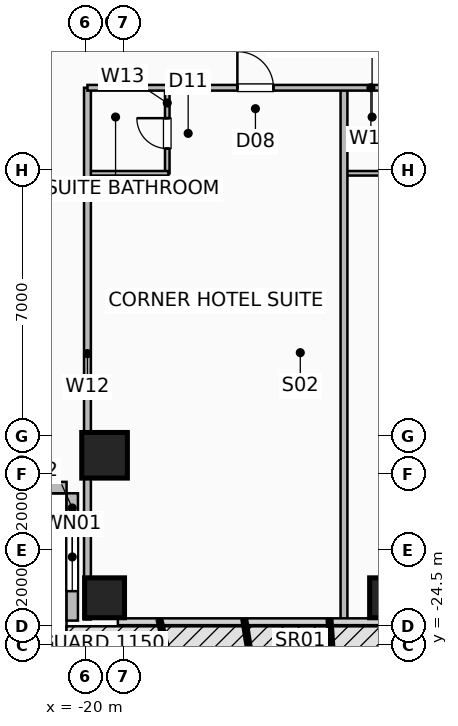
"""IFC4 building model, lengths in metres.
Left out: names, types, materials, properties, quantities, classifications, styles, units other than length and angle.
Written with IfcOpenShell. Run it as: python <this file> out.ifc"""

import sys

from ifc_helpers import new_model, si_unit, direction, frame, frame_2d, origin, origin_2d, place, context, subcontext, project, spatial, rectangle, hollow_rectangle, extrude, element, fill, save


model = new_model("IFC4")
c1 = context("Model", 3, precision=1e-05, world=origin(), true_north=direction((0.0, 1.0)))
c2 = subcontext(c1, "Body", "Model", "MODEL_VIEW")
j1 = project(units=[si_unit("LENGTHUNIT", "METRE"), si_unit("PLANEANGLEUNIT", "RADIAN")], contexts=[c1])
p1 = place(None, origin())
s1 = spatial("IfcSite", under=j1, at=p1, CompositionType="ELEMENT")
p2 = place(p1, origin())
s2 = spatial("IfcBuilding", under=s1, at=p2, CompositionType="ELEMENT")
p3 = place(p2, frame((0.0, 0.0, 27.0)))
s3 = spatial("IfcBuildingStorey", under=s2, at=p3, CompositionType="ELEMENT", Elevation=27.0)
p4 = place(p3, frame((-19.5, -23.25, 0.0), z_axis=(0.0, 0.0, 1.0), x_axis=(1.0, 0.0, 0.0)))
e1 = element("IfcColumn", 1, at=p4, inside=s3, PredefinedType="COLUMN", context=c2, shape_type="SweptSolid", body=[
    extrude(hollow_rectangle(XDim=1.05, YDim=1.05, WallThickness=0.05, at=origin_2d()), origin(), (0.0, 0.0, 1.0), 3.5),
])
p5 = place(p3, frame((-12.0, -23.25, -0.4), z_axis=(0.0, 0.0, 1.0), x_axis=(1.0, 0.0, 0.0)))
e2 = element("IfcColumn", 2, at=p5, inside=s3, PredefinedType="COLUMN", context=c2, shape_type="SweptSolid", body=[
    extrude(hollow_rectangle(XDim=1.05, YDim=1.05, WallThickness=0.05, at=origin_2d()), origin(), (0.0, 0.0, 1.0), 3.9),
])
p6 = place(p3, frame((-19.5, -19.5, 0.0), z_axis=(0.0, 0.0, 1.0), x_axis=(1.0, 0.0, 0.0)))
e3 = element("IfcColumn", 3, at=p6, inside=s3, PredefinedType="COLUMN", context=c2, shape_type="SweptSolid", body=[
    extrude(hollow_rectangle(XDim=1.2, YDim=1.2, WallThickness=0.055, at=origin_2d()), origin(), (0.0, 0.0, 1.0), 3.5),
])
p7 = place(p3, frame((-20.35, -23.85, 0.0), z_axis=(0.0, 0.0, 1.0), x_axis=(0.0, 1.0, 0.0)))
e4 = element("IfcWall", 4, at=p7, inside=s3, PredefinedType="SOLIDWALL", context=c2, shape_type="SweptSolid", body=[
    extrude(rectangle(XDim=3.35, YDim=0.3, at=frame_2d((1.675, 0.0))), origin(), (0.0, 0.0, 1.0), 3.25),
])
p8 = place(p7, frame((0.775, 0.0, 0.9)))
e5 = element("IfcOpeningElement", 5, at=p8, cuts=e4, PredefinedType="OPENING", context=c2, shape_type="SweptSolid", body=[
    extrude(rectangle(XDim=1.8, YDim=1.8, at=frame_2d((0.9, 0.9))), frame((0.0, 0.16, 0.0), z_axis=(0.0, -1.0, 0.0), x_axis=(1.0, 0.0, 0.0)), (0.0, 0.0, 1.0), 0.32),
])
p9 = place(p3, frame((-23.85, -20.35, 0.0), z_axis=(0.0, 0.0, 1.0), x_axis=(1.0, 0.0, 0.0)))
e6 = element("IfcWall", 6, at=p9, inside=s3, PredefinedType="SOLIDWALL", context=c2, shape_type="SweptSolid", body=[
    extrude(rectangle(XDim=3.35, YDim=0.3, at=frame_2d((1.675, 0.0))), origin(), (0.0, 0.0, 1.0), 3.25),
])
p10 = place(p3, frame((-17.85, -12.08, 0.0), z_axis=(0.0, 0.0, 1.0), x_axis=(0.0, 1.0, 0.0)))
e7 = element("IfcWall", 7, at=p10, inside=s3, PredefinedType="PLUMBINGWALL", context=c2, shape_type="SweptSolid", body=[
    extrude(rectangle(XDim=2.25, YDim=0.12, at=frame_2d((1.125, 0.0))), origin(), (0.0, 0.0, 1.0), 3.25),
])
p11 = place(p10, frame((0.65, 0.0, 0.0)))
e8 = element("IfcOpeningElement", 8, at=p11, cuts=e7, PredefinedType="OPENING", context=c2, shape_type="SweptSolid", body=[
    extrude(rectangle(XDim=0.8, YDim=2.05, at=frame_2d((0.4, 1.025))), frame((0.0, 0.07, 0.0), z_axis=(0.0, -1.0, 0.0), x_axis=(1.0, 0.0, 0.0)), (0.0, 0.0, 1.0), 0.14),
])
for number, where, z_axis, x_axis in (
    (9, (-19.92, -12.08, 0.0), (0.0, 0.0, 1.0), (1.0, 0.0, 0.0)),
    (10, (-13.17, -12.08, 0.0), (0.0, 0.0, 1.0), (1.0, 0.0, 0.0)),
):
    element("IfcWall", number, at=place(p3, frame(where, z_axis=z_axis, x_axis=x_axis)), inside=s3, PredefinedType="PLUMBINGWALL", context=c2, shape_type="SweptSolid", body=[
        extrude(rectangle(XDim=2.1, YDim=0.12, at=frame_2d((1.05, 0.0))), origin(), (0.0, 0.0, 1.0), 3.25),
    ])
for number, where, z_axis, x_axis in (
    (11, (-19.95, -23.82, 0.0), (0.0, 0.0, 1.0), (0.0, 1.0, 0.0)),
    (12, (-13.2, -23.82, 0.0), (0.0, 0.0, 1.0), (0.0, 1.0, 0.0)),
):
    element("IfcWall", number, at=place(p3, frame(where, z_axis=z_axis, x_axis=x_axis)), inside=s3, PredefinedType="PARTITIONING", context=c2, shape_type="SweptSolid", body=[
        extrude(rectangle(XDim=13.99, YDim=0.18, at=frame_2d((6.995, 0.0))), origin(), (0.0, 0.0, 1.0), 3.25),
    ])
p12 = place(p3, frame((-19.95, -9.83, 0.0), z_axis=(0.0, 0.0, 1.0), x_axis=(1.0, 0.0, 0.0)))
e13 = element("IfcWall", 13, at=p12, inside=s3, PredefinedType="PARTITIONING", context=c2, shape_type="SweptSolid", body=[
    extrude(rectangle(XDim=39.9, YDim=0.15, at=frame_2d((19.95, 0.0))), origin(), (0.0, 0.0, 1.0), 3.25),
])
p13 = place(p12, frame((3.945, 0.0, 0.0)))
e14 = element("IfcOpeningElement", 14, at=p13, cuts=e13, PredefinedType="OPENING", context=c2, shape_type="SweptSolid", body=[
    extrude(rectangle(XDim=0.95, YDim=2.08, at=frame_2d((0.475, 1.04))), frame((0.0, 0.085, 0.0), z_axis=(0.0, -1.0, 0.0), x_axis=(1.0, 0.0, 0.0)), (0.0, 0.0, 1.0), 0.17),
])
p14 = place(p12, frame((10.02, 0.0, 0.0)))
e15 = element("IfcOpeningElement", 15, at=p14, cuts=e13, PredefinedType="OPENING", context=c2, shape_type="SweptSolid", body=[
    extrude(rectangle(XDim=0.95, YDim=2.08, at=frame_2d((0.475, 1.04))), frame((0.0, 0.085, 0.0), z_axis=(0.0, -1.0, 0.0), x_axis=(1.0, 0.0, 0.0)), (0.0, 0.0, 1.0), 0.17),
])
p15 = place(p12, frame((15.42, 0.0, 0.0)))
e16 = element("IfcOpeningElement", 16, at=p15, cuts=e13, PredefinedType="OPENING", context=c2, shape_type="SweptSolid", body=[
    extrude(rectangle(XDim=0.95, YDim=2.08, at=frame_2d((0.475, 1.04))), frame((0.0, 0.085, 0.0), z_axis=(0.0, -1.0, 0.0), x_axis=(1.0, 0.0, 0.0)), (0.0, 0.0, 1.0), 0.17),
])
p16 = place(p12, frame((20.702, 0.0, 0.0)))
e17 = element("IfcOpeningElement", 17, at=p16, cuts=e13, PredefinedType="OPENING", context=c2, shape_type="SweptSolid", body=[
    extrude(rectangle(XDim=0.95, YDim=2.08, at=frame_2d((0.475, 1.04))), frame((0.0, 0.085, 0.0), z_axis=(0.0, -1.0, 0.0), x_axis=(1.0, 0.0, 0.0)), (0.0, 0.0, 1.0), 0.17),
])
p17 = place(p12, frame((26.02, 0.0, 0.0)))
e18 = element("IfcOpeningElement", 18, at=p17, cuts=e13, PredefinedType="OPENING", context=c2, shape_type="SweptSolid", body=[
    extrude(rectangle(XDim=0.95, YDim=2.08, at=frame_2d((0.475, 1.04))), frame((0.0, 0.085, 0.0), z_axis=(0.0, -1.0, 0.0), x_axis=(1.0, 0.0, 0.0)), (0.0, 0.0, 1.0), 0.17),
])
p18 = place(p12, frame((31.37, 0.0, 0.0)))
e19 = element("IfcOpeningElement", 19, at=p18, cuts=e13, PredefinedType="OPENING", context=c2, shape_type="SweptSolid", body=[
    extrude(rectangle(XDim=0.95, YDim=2.08, at=frame_2d((0.475, 1.04))), frame((0.0, 0.085, 0.0), z_axis=(0.0, -1.0, 0.0), x_axis=(1.0, 0.0, 0.0)), (0.0, 0.0, 1.0), 0.17),
])
p19 = place(p12, frame((37.245, 0.0, 0.0)))
e20 = element("IfcOpeningElement", 20, at=p19, cuts=e13, PredefinedType="OPENING", context=c2, shape_type="SweptSolid", body=[
    extrude(rectangle(XDim=0.95, YDim=2.08, at=frame_2d((0.475, 1.04))), frame((0.0, 0.085, 0.0), z_axis=(0.0, -1.0, 0.0), x_axis=(1.0, 0.0, 0.0)), (0.0, 0.0, 1.0), 0.17),
])
p20 = place(p8, origin())
e21 = element("IfcWindow", 21, at=p20, inside=s3, PartitioningType="SINGLE_PANEL", PredefinedType="WINDOW", context=c2, shape_type="SweptSolid", body=[
    extrude(rectangle(XDim=1.8, YDim=1.8, at=frame_2d((0.9, 0.9))), frame((0.0, 0.03, 0.0), z_axis=(0.0, -1.0, 0.0), x_axis=(1.0, 0.0, 0.0)), (0.0, 0.0, 1.0), 0.06),
])
fill(e5, e21)
p21 = place(p11, origin())
e22 = element("IfcDoor", 22, at=p21, inside=s3, OperationType="SINGLE_SWING_RIGHT", PredefinedType="DOOR", context=c2, shape_type="SweptSolid", body=[
    extrude(rectangle(XDim=0.8, YDim=2.05, at=frame_2d((0.4, 1.025))), frame((0.0, 0.025, 0.0), z_axis=(0.0, -1.0, 0.0), x_axis=(1.0, 0.0, 0.0)), (0.0, 0.0, 1.0), 0.05),
])
fill(e8, e22)
p22 = place(p13, origin())
e23 = element("IfcDoor", 23, at=p22, inside=s3, OperationType="SINGLE_SWING_LEFT", PredefinedType="DOOR", context=c2, shape_type="SweptSolid", body=[
    extrude(rectangle(XDim=0.95, YDim=2.08, at=frame_2d((0.475, 1.04))), frame((0.0, 0.025, 0.0), z_axis=(0.0, -1.0, 0.0), x_axis=(1.0, 0.0, 0.0)), (0.0, 0.0, 1.0), 0.05),
])
fill(e14, e23)
save(model, sys.argv[1])
